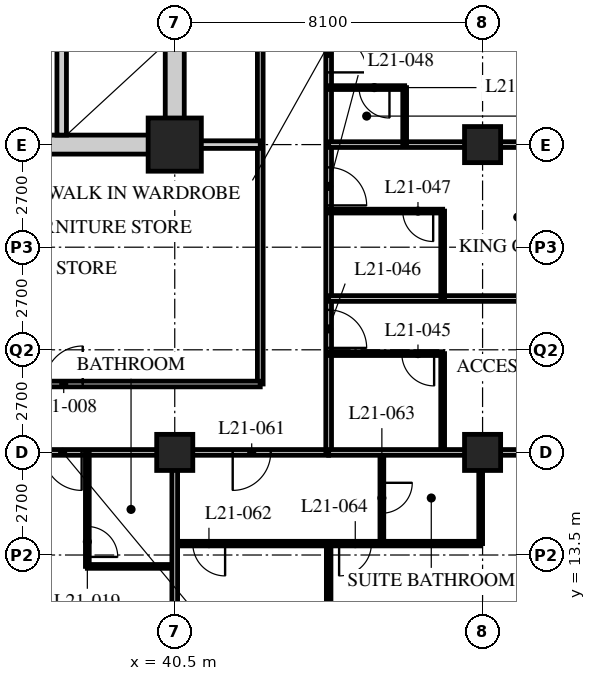
"""IFC4 building model, lengths in metres.
Left out: names, types, materials, properties, quantities, classifications, styles, units other than length and angle.
Written with IfcOpenShell. Run it as: python <this file> out.ifc"""

import sys

from ifc_helpers import new_model, si_unit, direction, frame, frame_2d, origin, origin_2d, place, context, subcontext, project, spatial, rectangle, hollow_rectangle, extrude, element, fill, save


model = new_model("IFC4")
c1 = context("Model", 3, precision=1e-05, world=origin(), true_north=direction((0.0, 1.0)))
c2 = subcontext(c1, "Body", "Model", "MODEL_VIEW")
j1 = project(units=[si_unit("LENGTHUNIT", "METRE"), si_unit("PLANEANGLEUNIT", "RADIAN")], contexts=[c1])
p1 = place(None, origin())
s1 = spatial("IfcSite", under=j1, at=p1, CompositionType="ELEMENT")
p2 = place(p1, origin())
s2 = spatial("IfcBuilding", under=s1, at=p2, CompositionType="ELEMENT")
p3 = place(p2, frame((0.0, 0.0, 84.0)))
s3 = spatial("IfcBuildingStorey", under=s2, at=p3, CompositionType="ELEMENT", Elevation=84.0)
p4 = place(p3, frame((40.5, 16.2, 0.0), z_axis=(0.0, 0.0, 1.0), x_axis=(1.0, 0.0, 0.0)))
e1 = element("IfcColumn", 1, at=p4, inside=s3, PredefinedType="COLUMN", context=c2, shape_type="SweptSolid", body=[
    extrude(hollow_rectangle(XDim=0.95, YDim=0.95, WallThickness=0.095, at=origin_2d()), origin(), (0.0, 0.0, 1.0), 3.4),
])
p5 = place(p3, frame((40.5, 24.3, 0.0), z_axis=(0.0, 0.0, 1.0), x_axis=(1.0, 0.0, 0.0)))
e2 = element("IfcColumn", 2, at=p5, inside=s3, PredefinedType="COLUMN", context=c2, shape_type="SweptSolid", body=[
    extrude(hollow_rectangle(XDim=1.4, YDim=1.4, WallThickness=0.12, at=origin_2d()), origin(), (0.0, 0.0, 1.0), 3.4),
])
for number, where, z_axis, x_axis in (
    (3, (48.6, 16.2, 0.0), (0.0, 0.0, 1.0), (1.0, 0.0, 0.0)),
    (4, (48.6, 24.3, 0.0), (0.0, 0.0, 1.0), (1.0, 0.0, 0.0)),
):
    element("IfcColumn", number, at=place(p3, frame(where, z_axis=z_axis, x_axis=x_axis)), inside=s3, PredefinedType="COLUMN", context=c2, shape_type="SweptSolid", body=[
        extrude(hollow_rectangle(XDim=0.95, YDim=0.95, WallThickness=0.095, at=origin_2d()), origin(), (0.0, 0.0, 1.0), 3.4),
    ])
p6 = place(p3, frame((12.15, 16.2, 0.0), z_axis=(0.0, 0.0, 1.0), x_axis=(1.0, 0.0, 0.0)))
e5 = element("IfcWall", 5, at=p6, inside=s3, PredefinedType="PARTITIONING", context=c2, shape_type="SweptSolid", body=[
    extrude(rectangle(XDim=32.4, YDim=0.15, at=frame_2d((16.2, 0.0))), origin(), (0.0, 0.0, 1.0), 2.428),
])
p7 = place(p6, frame((6.5, 0.0, 0.0)))
e6 = element("IfcOpeningElement", 6, at=p7, cuts=e5, PredefinedType="OPENING", context=c2, shape_type="SweptSolid", body=[
    extrude(rectangle(XDim=1.0, YDim=2.1, at=frame_2d((0.5, 1.05))), frame((0.0, 0.085, 0.0), z_axis=(0.0, -1.0, 0.0), x_axis=(1.0, 0.0, 0.0)), (0.0, 0.0, 1.0), 0.17),
])
p8 = place(p6, frame((8.4, 0.0, 0.0)))
e7 = element("IfcOpeningElement", 7, at=p8, cuts=e5, PredefinedType="OPENING", context=c2, shape_type="SweptSolid", body=[
    extrude(rectangle(XDim=1.0, YDim=2.1, at=frame_2d((0.5, 1.05))), frame((0.0, 0.085, 0.0), z_axis=(0.0, -1.0, 0.0), x_axis=(1.0, 0.0, 0.0)), (0.0, 0.0, 1.0), 0.17),
])
p9 = place(p6, frame((14.9, 0.0, 0.0)))
e8 = element("IfcOpeningElement", 8, at=p9, cuts=e5, PredefinedType="OPENING", context=c2, shape_type="SweptSolid", body=[
    extrude(rectangle(XDim=1.0, YDim=2.1, at=frame_2d((0.5, 1.05))), frame((0.0, 0.085, 0.0), z_axis=(0.0, -1.0, 0.0), x_axis=(1.0, 0.0, 0.0)), (0.0, 0.0, 1.0), 0.17),
])
p10 = place(p6, frame((16.5, 0.0, 0.0)))
e9 = element("IfcOpeningElement", 9, at=p10, cuts=e5, PredefinedType="OPENING", context=c2, shape_type="SweptSolid", body=[
    extrude(rectangle(XDim=1.0, YDim=2.1, at=frame_2d((0.5, 1.05))), frame((0.0, 0.085, 0.0), z_axis=(0.0, -1.0, 0.0), x_axis=(1.0, 0.0, 0.0)), (0.0, 0.0, 1.0), 0.17),
])
p11 = place(p6, frame((23.0, 0.0, 0.0)))
e10 = element("IfcOpeningElement", 10, at=p11, cuts=e5, PredefinedType="OPENING", context=c2, shape_type="SweptSolid", body=[
    extrude(rectangle(XDim=1.0, YDim=2.1, at=frame_2d((0.5, 1.05))), frame((0.0, 0.085, 0.0), z_axis=(0.0, -1.0, 0.0), x_axis=(1.0, 0.0, 0.0)), (0.0, 0.0, 1.0), 0.17),
])
p12 = place(p6, frame((24.9, 0.0, 0.0)))
e11 = element("IfcOpeningElement", 11, at=p12, cuts=e5, PredefinedType="OPENING", context=c2, shape_type="SweptSolid", body=[
    extrude(rectangle(XDim=1.0, YDim=2.1, at=frame_2d((0.5, 1.05))), frame((0.0, 0.085, 0.0), z_axis=(0.0, -1.0, 0.0), x_axis=(1.0, 0.0, 0.0)), (0.0, 0.0, 1.0), 0.17),
])
p13 = place(p6, frame((1.525, 0.0, 0.0)))
e12 = element("IfcOpeningElement", 12, at=p13, cuts=e5, PredefinedType="OPENING", context=c2, shape_type="SweptSolid", body=[
    extrude(rectangle(XDim=1.0, YDim=2.1, at=frame_2d((0.5, 1.05))), frame((0.0, 0.085, 0.0), z_axis=(0.0, -1.0, 0.0), x_axis=(1.0, 0.0, 0.0)), (0.0, 0.0, 1.0), 0.17),
])
p14 = place(p6, frame((29.875, 0.0, 0.0)))
e13 = element("IfcOpeningElement", 13, at=p14, cuts=e5, PredefinedType="OPENING", context=c2, shape_type="SweptSolid", body=[
    extrude(rectangle(XDim=1.0, YDim=2.1, at=frame_2d((0.5, 1.05))), frame((0.0, 0.085, 0.0), z_axis=(0.0, -1.0, 0.0), x_axis=(1.0, 0.0, 0.0)), (0.0, 0.0, 1.0), 0.17),
])
p15 = place(p3, frame((44.55, 16.2, 0.0), z_axis=(0.0, 0.0, 1.0), x_axis=(0.0, 1.0, 0.0)))
e14 = element("IfcWall", 14, at=p15, inside=s3, PredefinedType="PARTITIONING", context=c2, shape_type="SweptSolid", body=[
    extrude(rectangle(XDim=26.1, YDim=0.15, at=frame_2d((13.05, 0.0))), origin(), (0.0, 0.0, 1.0), 3.19),
])
p16 = place(p15, frame((2.75, 0.0, 0.0)))
e15 = element("IfcOpeningElement", 15, at=p16, cuts=e14, PredefinedType="OPENING", context=c2, shape_type="SweptSolid", body=[
    extrude(rectangle(XDim=1.0, YDim=2.1, at=frame_2d((0.5, 1.05))), frame((0.0, 0.085, 0.0), z_axis=(0.0, -1.0, 0.0), x_axis=(1.0, 0.0, 0.0)), (0.0, 0.0, 1.0), 0.17),
])
p17 = place(p15, frame((6.5, 0.0, 0.0)))
e16 = element("IfcOpeningElement", 16, at=p17, cuts=e14, PredefinedType="OPENING", context=c2, shape_type="SweptSolid", body=[
    extrude(rectangle(XDim=1.0, YDim=2.1, at=frame_2d((0.5, 1.05))), frame((0.0, 0.085, 0.0), z_axis=(0.0, -1.0, 0.0), x_axis=(1.0, 0.0, 0.0)), (0.0, 0.0, 1.0), 0.17),
])
p18 = place(p15, frame((10.0, 0.0, 0.0)))
e17 = element("IfcOpeningElement", 17, at=p18, cuts=e14, PredefinedType="OPENING", context=c2, shape_type="SweptSolid", body=[
    extrude(rectangle(XDim=1.0, YDim=2.1, at=frame_2d((0.5, 1.05))), frame((0.0, 0.085, 0.0), z_axis=(0.0, -1.0, 0.0), x_axis=(1.0, 0.0, 0.0)), (0.0, 0.0, 1.0), 0.17),
])
p19 = place(p15, frame((18.1, 0.0, 0.0)))
e18 = element("IfcOpeningElement", 18, at=p19, cuts=e14, PredefinedType="OPENING", context=c2, shape_type="SweptSolid", body=[
    extrude(rectangle(XDim=1.0, YDim=2.1, at=frame_2d((0.5, 1.05))), frame((0.0, 0.085, 0.0), z_axis=(0.0, -1.0, 0.0), x_axis=(1.0, 0.0, 0.0)), (0.0, 0.0, 1.0), 0.17),
])
p20 = place(p3, frame((42.75, 18.0, 0.0), z_axis=(0.0, 0.0, 1.0), x_axis=(0.0, 1.0, 0.0)))
e19 = element("IfcWall", 19, at=p20, inside=s3, PredefinedType="PARTITIONING", context=c2, shape_type="SweptSolid", body=[
    extrude(rectangle(XDim=22.5, YDim=0.15, at=frame_2d((11.25, 0.0))), origin(), (0.0, 0.0, 1.0), 3.19),
])
p21 = place(p20, frame((9.85, 0.0, 0.0)))
e20 = element("IfcOpeningElement", 20, at=p21, cuts=e19, PredefinedType="OPENING", context=c2, shape_type="SweptSolid", body=[
    extrude(rectangle(XDim=1.0, YDim=2.1, at=frame_2d((0.5, 1.05))), frame((0.0, 0.085, 0.0), z_axis=(0.0, -1.0, 0.0), x_axis=(1.0, 0.0, 0.0)), (0.0, 0.0, 1.0), 0.17),
])
p22 = place(p20, frame((17.95, 0.0, 0.0)))
e21 = element("IfcOpeningElement", 21, at=p22, cuts=e19, PredefinedType="OPENING", context=c2, shape_type="SweptSolid", body=[
    extrude(rectangle(XDim=1.0, YDim=2.1, at=frame_2d((0.5, 1.05))), frame((0.0, 0.085, 0.0), z_axis=(0.0, -1.0, 0.0), x_axis=(1.0, 0.0, 0.0)), (0.0, 0.0, 1.0), 0.17),
])
p23 = place(p3, frame((29.56, 18.0, 0.0), z_axis=(0.0, 0.0, 1.0), x_axis=(1.0, 0.0, 0.0)))
e22 = element("IfcWall", 22, at=p23, inside=s3, PredefinedType="PARTITIONING", context=c2, shape_type="SweptSolid", body=[
    extrude(rectangle(XDim=13.19, YDim=0.15, at=frame_2d((6.595, 0.0))), origin(), (0.0, 0.0, 1.0), 3.19),
])
p24 = place(p23, frame((0.919, 0.0, 0.0)))
e23 = element("IfcOpeningElement", 23, at=p24, cuts=e22, PredefinedType="OPENING", context=c2, shape_type="SweptSolid", body=[
    extrude(rectangle(XDim=1.0, YDim=2.1, at=frame_2d((0.5, 1.05))), frame((0.0, 0.085, 0.0), z_axis=(0.0, -1.0, 0.0), x_axis=(1.0, 0.0, 0.0)), (0.0, 0.0, 1.0), 0.17),
])
p25 = place(p23, frame((7.519, 0.0, 0.0)))
e24 = element("IfcOpeningElement", 24, at=p25, cuts=e22, PredefinedType="OPENING", context=c2, shape_type="SweptSolid", body=[
    extrude(rectangle(XDim=1.0, YDim=2.1, at=frame_2d((0.5, 1.05))), frame((0.0, 0.085, 0.0), z_axis=(0.0, -1.0, 0.0), x_axis=(1.0, 0.0, 0.0)), (0.0, 0.0, 1.0), 0.17),
])
p26 = place(p3, frame((40.5, 24.3, 0.0), z_axis=(0.0, 0.0, 1.0), x_axis=(1.0, 0.0, 0.0)))
e25 = element("IfcWall", 25, at=p26, inside=s3, PredefinedType="SOLIDWALL", context=c2, shape_type="SweptSolid", body=[
    extrude(rectangle(XDim=2.25, YDim=0.2, at=frame_2d((1.125, 0.0))), origin(), (0.0, 0.0, 1.0), 2.428),
])
p27 = place(p3, frame((38.2, 13.2, 0.0), z_axis=(0.0, 0.0, 1.0), x_axis=(1.0, 0.0, 0.0)))
e26 = element("IfcWall", 26, at=p27, inside=s3, PredefinedType="PARTITIONING", context=c2, shape_type="SweptSolid", body=[
    extrude(rectangle(XDim=2.3, YDim=0.1, at=frame_2d((1.15, 0.0))), origin(), (0.0, 0.0, 1.0), 3.19),
])
p28 = place(p3, frame((38.2, 16.2, 0.0), z_axis=(0.0, 0.0, 1.0), x_axis=(0.0, -1.0, 0.0)))
e27 = element("IfcWall", 27, at=p28, inside=s3, PredefinedType="PARTITIONING", context=c2, shape_type="SweptSolid", body=[
    extrude(rectangle(XDim=3.0, YDim=0.1, at=frame_2d((1.5, 0.0))), origin(), (0.0, 0.0, 1.0), 3.19),
])
p29 = place(p28, frame((1.95, 0.0, 0.0)))
e28 = element("IfcOpeningElement", 28, at=p29, cuts=e27, PredefinedType="OPENING", context=c2, shape_type="SweptSolid", body=[
    extrude(rectangle(XDim=0.8, YDim=2.1, at=frame_2d((0.4, 1.05))), frame((0.0, 0.06, 0.0), z_axis=(0.0, -1.0, 0.0), x_axis=(1.0, 0.0, 0.0)), (0.0, 0.0, 1.0), 0.12),
])
p30 = place(p3, frame((47.55, 16.2, 0.0), z_axis=(0.0, 0.0, 1.0), x_axis=(0.0, 1.0, 0.0)))
e29 = element("IfcWall", 29, at=p30, inside=s3, PredefinedType="PARTITIONING", context=c2, shape_type="SweptSolid", body=[
    extrude(rectangle(XDim=2.6, YDim=0.1, at=frame_2d((1.3, 0.0))), origin(), (0.0, 0.0, 1.0), 3.19),
])
p31 = place(p3, frame((44.55, 18.8, 0.0), z_axis=(0.0, 0.0, 1.0), x_axis=(1.0, 0.0, 0.0)))
e30 = element("IfcWall", 30, at=p31, inside=s3, PredefinedType="PARTITIONING", context=c2, shape_type="SweptSolid", body=[
    extrude(rectangle(XDim=3.0, YDim=0.1, at=frame_2d((1.5, 0.0))), origin(), (0.0, 0.0, 1.0), 3.19),
])
p32 = place(p31, frame((1.925, 0.0, 0.0)))
e31 = element("IfcOpeningElement", 31, at=p32, cuts=e30, PredefinedType="OPENING", context=c2, shape_type="SweptSolid", body=[
    extrude(rectangle(XDim=0.85, YDim=2.1, at=frame_2d((0.425, 1.05))), frame((0.0, 0.06, 0.0), z_axis=(0.0, -1.0, 0.0), x_axis=(1.0, 0.0, 0.0)), (0.0, 0.0, 1.0), 0.12),
])
p33 = place(p3, frame((44.55, 20.25, 0.0), z_axis=(0.0, 0.0, 1.0), x_axis=(1.0, 0.0, 0.0)))
e32 = element("IfcWall", 32, at=p33, inside=s3, PredefinedType="PARTITIONING", context=c2, shape_type="SweptSolid", body=[
    extrude(rectangle(XDim=11.85, YDim=0.15, at=frame_2d((5.925, 0.0))), origin(), (0.0, 0.0, 1.0), 3.19),
])
p34 = place(p3, frame((47.55, 20.25, 0.0), z_axis=(0.0, 0.0, 1.0), x_axis=(0.0, 1.0, 0.0)))
e33 = element("IfcWall", 33, at=p34, inside=s3, PredefinedType="PARTITIONING", context=c2, shape_type="SweptSolid", body=[
    extrude(rectangle(XDim=2.3, YDim=0.1, at=frame_2d((1.15, 0.0))), origin(), (0.0, 0.0, 1.0), 3.19),
])
p35 = place(p3, frame((44.55, 22.55, 0.0), z_axis=(0.0, 0.0, 1.0), x_axis=(1.0, 0.0, 0.0)))
e34 = element("IfcWall", 34, at=p35, inside=s3, PredefinedType="PARTITIONING", context=c2, shape_type="SweptSolid", body=[
    extrude(rectangle(XDim=3.0, YDim=0.1, at=frame_2d((1.5, 0.0))), origin(), (0.0, 0.0, 1.0), 3.19),
])
p36 = place(p35, frame((1.95, 0.0, 0.0)))
e35 = element("IfcOpeningElement", 35, at=p36, cuts=e34, PredefinedType="OPENING", context=c2, shape_type="SweptSolid", body=[
    extrude(rectangle(XDim=0.8, YDim=2.1, at=frame_2d((0.4, 1.05))), frame((0.0, 0.06, 0.0), z_axis=(0.0, -1.0, 0.0), x_axis=(1.0, 0.0, 0.0)), (0.0, 0.0, 1.0), 0.12),
])
p37 = place(p3, frame((44.55, 24.3, 0.0), z_axis=(0.0, 0.0, 1.0), x_axis=(1.0, 0.0, 0.0)))
e36 = element("IfcWall", 36, at=p37, inside=s3, PredefinedType="PARTITIONING", context=c2, shape_type="SweptSolid", body=[
    extrude(rectangle(XDim=11.85, YDim=0.15, at=frame_2d((5.925, 0.0))), origin(), (0.0, 0.0, 1.0), 2.428),
])
p38 = place(p3, frame((46.55, 24.3, 0.0), z_axis=(0.0, 0.0, 1.0), x_axis=(0.0, 1.0, 0.0)))
e37 = element("IfcWall", 37, at=p38, inside=s3, PredefinedType="PARTITIONING", context=c2, shape_type="SweptSolid", body=[
    extrude(rectangle(XDim=1.5, YDim=0.1, at=frame_2d((0.75, 0.0))), origin(), (0.0, 0.0, 1.0), 3.19),
])
p39 = place(p3, frame((44.55, 25.8, 0.0), z_axis=(0.0, 0.0, 1.0), x_axis=(1.0, 0.0, 0.0)))
e38 = element("IfcWall", 38, at=p39, inside=s3, PredefinedType="PARTITIONING", context=c2, shape_type="SweptSolid", body=[
    extrude(rectangle(XDim=2.0, YDim=0.1, at=frame_2d((1.0, 0.0))), origin(), (0.0, 0.0, 1.0), 3.19),
])
p40 = place(p39, frame((0.8, 0.0, 0.0)))
e39 = element("IfcOpeningElement", 39, at=p40, cuts=e38, PredefinedType="OPENING", context=c2, shape_type="SweptSolid", body=[
    extrude(rectangle(XDim=0.8, YDim=2.1, at=frame_2d((0.4, 1.05))), frame((0.0, 0.06, 0.0), z_axis=(0.0, -1.0, 0.0), x_axis=(1.0, 0.0, 0.0)), (0.0, 0.0, 1.0), 0.12),
])
p41 = place(p3, frame((40.5, 13.8, 0.0), z_axis=(0.0, 0.0, 1.0), x_axis=(1.0, 0.0, 0.0)))
e40 = element("IfcWall", 40, at=p41, inside=s3, PredefinedType="PARTITIONING", context=c2, shape_type="SweptSolid", body=[
    extrude(rectangle(XDim=8.05, YDim=0.12, at=frame_2d((4.025, 0.0))), origin(), (0.0, 0.0, 1.0), 3.19),
])
p42 = place(p41, frame((0.475, 0.0, 0.0)))
e41 = element("IfcOpeningElement", 41, at=p42, cuts=e40, PredefinedType="OPENING", context=c2, shape_type="SweptSolid", body=[
    extrude(rectangle(XDim=0.85, YDim=2.1, at=frame_2d((0.425, 1.05))), frame((0.0, 0.07, 0.0), z_axis=(0.0, -1.0, 0.0), x_axis=(1.0, 0.0, 0.0)), (0.0, 0.0, 1.0), 0.14),
])
p43 = place(p41, frame((4.325, 0.0, 0.0)))
e42 = element("IfcOpeningElement", 42, at=p43, cuts=e40, PredefinedType="OPENING", context=c2, shape_type="SweptSolid", body=[
    extrude(rectangle(XDim=0.85, YDim=2.1, at=frame_2d((0.425, 1.05))), frame((0.0, 0.07, 0.0), z_axis=(0.0, -1.0, 0.0), x_axis=(1.0, 0.0, 0.0)), (0.0, 0.0, 1.0), 0.14),
])
p44 = place(p3, frame((45.95, 16.2, 0.0), z_axis=(0.0, 0.0, 1.0), x_axis=(0.0, -1.0, 0.0)))
e43 = element("IfcWall", 43, at=p44, inside=s3, PredefinedType="PARTITIONING", context=c2, shape_type="SweptSolid", body=[
    extrude(rectangle(XDim=2.4, YDim=0.1, at=frame_2d((1.2, 0.0))), origin(), (0.0, 0.0, 1.0), 3.19),
])
p45 = place(p44, frame((0.8, 0.0, 0.0)))
e44 = element("IfcOpeningElement", 44, at=p45, cuts=e43, PredefinedType="OPENING", context=c2, shape_type="SweptSolid", body=[
    extrude(rectangle(XDim=0.8, YDim=2.1, at=frame_2d((0.4, 1.05))), frame((0.0, 0.06, 0.0), z_axis=(0.0, -1.0, 0.0), x_axis=(1.0, 0.0, 0.0)), (0.0, 0.0, 1.0), 0.12),
])
p46 = place(p3, frame((48.55, 16.2, 0.0), z_axis=(0.0, 0.0, 1.0), x_axis=(0.0, -1.0, 0.0)))
e45 = element("IfcWall", 45, at=p46, inside=s3, PredefinedType="PARTITIONING", context=c2, shape_type="SweptSolid", body=[
    extrude(rectangle(XDim=2.4, YDim=0.1, at=frame_2d((1.2, 0.0))), origin(), (0.0, 0.0, 1.0), 2.428),
])
p47 = place(p3, frame((44.55, 13.8, 0.0), z_axis=(0.0, 0.0, 1.0), x_axis=(0.0, -1.0, 0.0)))
e46 = element("IfcWall", 46, at=p47, inside=s3, PredefinedType="PARTITIONING", context=c2, shape_type="SweptSolid", body=[
    extrude(rectangle(XDim=13.5, YDim=0.12, at=frame_2d((6.75, 0.0))), origin(), (0.0, 0.0, 1.0), 3.19),
])
p48 = place(p3, frame((44.55, 16.2, 0.0), z_axis=(0.0, 0.0, 1.0), x_axis=(1.0, 0.0, 0.0)))
e47 = element("IfcWall", 47, at=p48, inside=s3, PredefinedType="PARTITIONING", context=c2, shape_type="SweptSolid", body=[
    extrude(rectangle(XDim=11.85, YDim=0.15, at=frame_2d((5.925, 0.0))), origin(), (0.0, 0.0, 1.0), 2.428),
])
p49 = place(p3, frame((40.5, 16.2, 0.0), z_axis=(0.0, 0.0, 1.0), x_axis=(0.0, -1.0, 0.0)))
e48 = element("IfcWall", 48, at=p49, inside=s3, PredefinedType="PARTITIONING", context=c2, shape_type="SweptSolid", body=[
    extrude(rectangle(XDim=15.9, YDim=0.15, at=frame_2d((7.95, 0.0))), origin(), (0.0, 0.0, 1.0), 2.428),
])
p50 = place(p3, frame((15.95, 24.3, 0.0), z_axis=(0.0, 0.0, 1.0), x_axis=(1.0, 0.0, 0.0)))
e49 = element("IfcWall", 49, at=p50, inside=s3, PredefinedType="SOLIDWALL", context=c2, shape_type="SweptSolid", body=[
    extrude(rectangle(XDim=24.8, YDim=0.5, at=frame_2d((12.4, 0.0))), origin(), (0.0, 0.0, 1.0), 2.428),
])
p51 = place(p50, frame((11.5, 0.0, 0.0)))
e50 = element("IfcOpeningElement", 50, at=p51, cuts=e49, PredefinedType="OPENING", context=c2, shape_type="SweptSolid", body=[
    extrude(rectangle(XDim=1.8, YDim=2.4, at=frame_2d((0.9, 1.2))), frame((0.0, 0.26, 0.0), z_axis=(0.0, -1.0, 0.0), x_axis=(1.0, 0.0, 0.0)), (0.0, 0.0, 1.0), 0.52),
])
p52 = place(p3, frame((40.5, 24.55, 0.0), z_axis=(0.0, 0.0, 1.0), x_axis=(0.0, 1.0, 0.0)))
e51 = element("IfcWall", 51, at=p52, inside=s3, PredefinedType="SOLIDWALL", context=c2, shape_type="SweptSolid", body=[
    extrude(rectangle(XDim=15.7, YDim=0.5, at=frame_2d((7.85, 0.0))), origin(), (0.0, 0.0, 1.0), 2.428),
])
p53 = place(p3, frame((37.525, 24.55, 0.0), z_axis=(0.0, 0.0, 1.0), x_axis=(0.0, 1.0, 0.0)))
e52 = element("IfcWall", 52, at=p53, inside=s3, PredefinedType="SOLIDWALL", context=c2, shape_type="SweptSolid", body=[
    extrude(rectangle(XDim=7.75, YDim=0.25, at=frame_2d((3.875, 0.0))), origin(), (0.0, 0.0, 1.0), 3.19),
])
p54 = place(p25, origin())
e53 = element("IfcDoor", 53, at=p54, inside=s3, OperationType="SINGLE_SWING_RIGHT", PredefinedType="DOOR", context=c2, shape_type="SweptSolid", body=[
    extrude(rectangle(XDim=1.0, YDim=2.1, at=frame_2d((0.5, 1.05))), frame((0.0, 0.025, 0.0), z_axis=(0.0, -1.0, 0.0), x_axis=(1.0, 0.0, 0.0)), (0.0, 0.0, 1.0), 0.05),
])
fill(e24, e53)
p55 = place(p29, origin())
e54 = element("IfcDoor", 54, at=p55, inside=s3, OperationType="SINGLE_SWING_RIGHT", PredefinedType="DOOR", context=c2, shape_type="SweptSolid", body=[
    extrude(rectangle(XDim=0.8, YDim=2.1, at=frame_2d((0.4, 1.05))), frame((0.0, 0.025, 0.0), z_axis=(0.0, -1.0, 0.0), x_axis=(1.0, 0.0, 0.0)), (0.0, 0.0, 1.0), 0.05),
])
fill(e28, e54)
p56 = place(p12, origin())
e55 = element("IfcDoor", 55, at=p56, inside=s3, OperationType="SINGLE_SWING_LEFT", PredefinedType="DOOR", context=c2, shape_type="SweptSolid", body=[
    extrude(rectangle(XDim=1.0, YDim=2.1, at=frame_2d((0.5, 1.05))), frame((0.0, 0.025, 0.0), z_axis=(0.0, -1.0, 0.0), x_axis=(1.0, 0.0, 0.0)), (0.0, 0.0, 1.0), 0.05),
])
fill(e11, e55)
p57 = place(p32, origin())
e56 = element("IfcDoor", 56, at=p57, inside=s3, OperationType="SINGLE_SWING_LEFT", PredefinedType="DOOR", context=c2, shape_type="SweptSolid", body=[
    extrude(rectangle(XDim=0.85, YDim=2.1, at=frame_2d((0.425, 1.05))), frame((0.0, 0.025, 0.0), z_axis=(0.0, -1.0, 0.0), x_axis=(1.0, 0.0, 0.0)), (0.0, 0.0, 1.0), 0.05),
])
fill(e31, e56)
p58 = place(p16, origin())
e57 = element("IfcDoor", 57, at=p58, inside=s3, OperationType="SINGLE_SWING_RIGHT", PredefinedType="DOOR", context=c2, shape_type="SweptSolid", body=[
    extrude(rectangle(XDim=1.0, YDim=2.1, at=frame_2d((0.5, 1.05))), frame((0.0, 0.025, 0.0), z_axis=(0.0, -1.0, 0.0), x_axis=(1.0, 0.0, 0.0)), (0.0, 0.0, 1.0), 0.05),
])
fill(e15, e57)
p59 = place(p36, origin())
e58 = element("IfcDoor", 58, at=p59, inside=s3, OperationType="SINGLE_SWING_LEFT", PredefinedType="DOOR", context=c2, shape_type="SweptSolid", body=[
    extrude(rectangle(XDim=0.8, YDim=2.1, at=frame_2d((0.4, 1.05))), frame((0.0, 0.025, 0.0), z_axis=(0.0, -1.0, 0.0), x_axis=(1.0, 0.0, 0.0)), (0.0, 0.0, 1.0), 0.05),
])
fill(e35, e58)
p60 = place(p17, origin())
e59 = element("IfcDoor", 59, at=p60, inside=s3, OperationType="SINGLE_SWING_RIGHT", PredefinedType="DOOR", context=c2, shape_type="SweptSolid", body=[
    extrude(rectangle(XDim=1.0, YDim=2.1, at=frame_2d((0.5, 1.05))), frame((0.0, 0.025, 0.0), z_axis=(0.0, -1.0, 0.0), x_axis=(1.0, 0.0, 0.0)), (0.0, 0.0, 1.0), 0.05),
])
fill(e16, e59)
p61 = place(p40, origin())
e60 = element("IfcDoor", 60, at=p61, inside=s3, OperationType="SINGLE_SWING_LEFT", PredefinedType="DOOR", context=c2, shape_type="SweptSolid", body=[
    extrude(rectangle(XDim=0.8, YDim=2.1, at=frame_2d((0.4, 1.05))), frame((0.0, 0.025, 0.0), z_axis=(0.0, -1.0, 0.0), x_axis=(1.0, 0.0, 0.0)), (0.0, 0.0, 1.0), 0.05),
])
fill(e39, e60)
p62 = place(p18, origin())
e61 = element("IfcDoor", 61, at=p62, inside=s3, OperationType="SINGLE_SWING_RIGHT", PredefinedType="DOOR", context=c2, shape_type="SweptSolid", body=[
    extrude(rectangle(XDim=1.0, YDim=2.1, at=frame_2d((0.5, 1.05))), frame((0.0, 0.025, 0.0), z_axis=(0.0, -1.0, 0.0), x_axis=(1.0, 0.0, 0.0)), (0.0, 0.0, 1.0), 0.05),
])
fill(e17, e61)
p63 = place(p14, origin())
e62 = element("IfcDoor", 62, at=p63, inside=s3, OperationType="SINGLE_SWING_RIGHT", PredefinedType="DOOR", context=c2, shape_type="SweptSolid", body=[
    extrude(rectangle(XDim=1.0, YDim=2.1, at=frame_2d((0.5, 1.05))), frame((0.0, 0.025, 0.0), z_axis=(0.0, -1.0, 0.0), x_axis=(1.0, 0.0, 0.0)), (0.0, 0.0, 1.0), 0.05),
])
fill(e13, e62)
p64 = place(p42, origin())
e63 = element("IfcDoor", 63, at=p64, inside=s3, OperationType="SINGLE_SWING_LEFT", PredefinedType="DOOR", context=c2, shape_type="SweptSolid", body=[
    extrude(rectangle(XDim=0.85, YDim=2.1, at=frame_2d((0.425, 1.05))), frame((0.0, 0.025, 0.0), z_axis=(0.0, -1.0, 0.0), x_axis=(1.0, 0.0, 0.0)), (0.0, 0.0, 1.0), 0.05),
])
fill(e41, e63)
p65 = place(p45, origin())
e64 = element("IfcDoor", 64, at=p65, inside=s3, OperationType="SINGLE_SWING_LEFT", PredefinedType="DOOR", context=c2, shape_type="SweptSolid", body=[
    extrude(rectangle(XDim=0.8, YDim=2.1, at=frame_2d((0.4, 1.05))), frame((0.0, 0.025, 0.0), z_axis=(0.0, -1.0, 0.0), x_axis=(1.0, 0.0, 0.0)), (0.0, 0.0, 1.0), 0.05),
])
fill(e44, e64)
p66 = place(p43, origin())
e65 = element("IfcDoor", 65, at=p66, inside=s3, OperationType="SINGLE_SWING_RIGHT", PredefinedType="DOOR", context=c2, shape_type="SweptSolid", body=[
    extrude(rectangle(XDim=0.85, YDim=2.1, at=frame_2d((0.425, 1.05))), frame((0.0, 0.025, 0.0), z_axis=(0.0, -1.0, 0.0), x_axis=(1.0, 0.0, 0.0)), (0.0, 0.0, 1.0), 0.05),
])
fill(e42, e65)
save(model, sys.argv[1])
